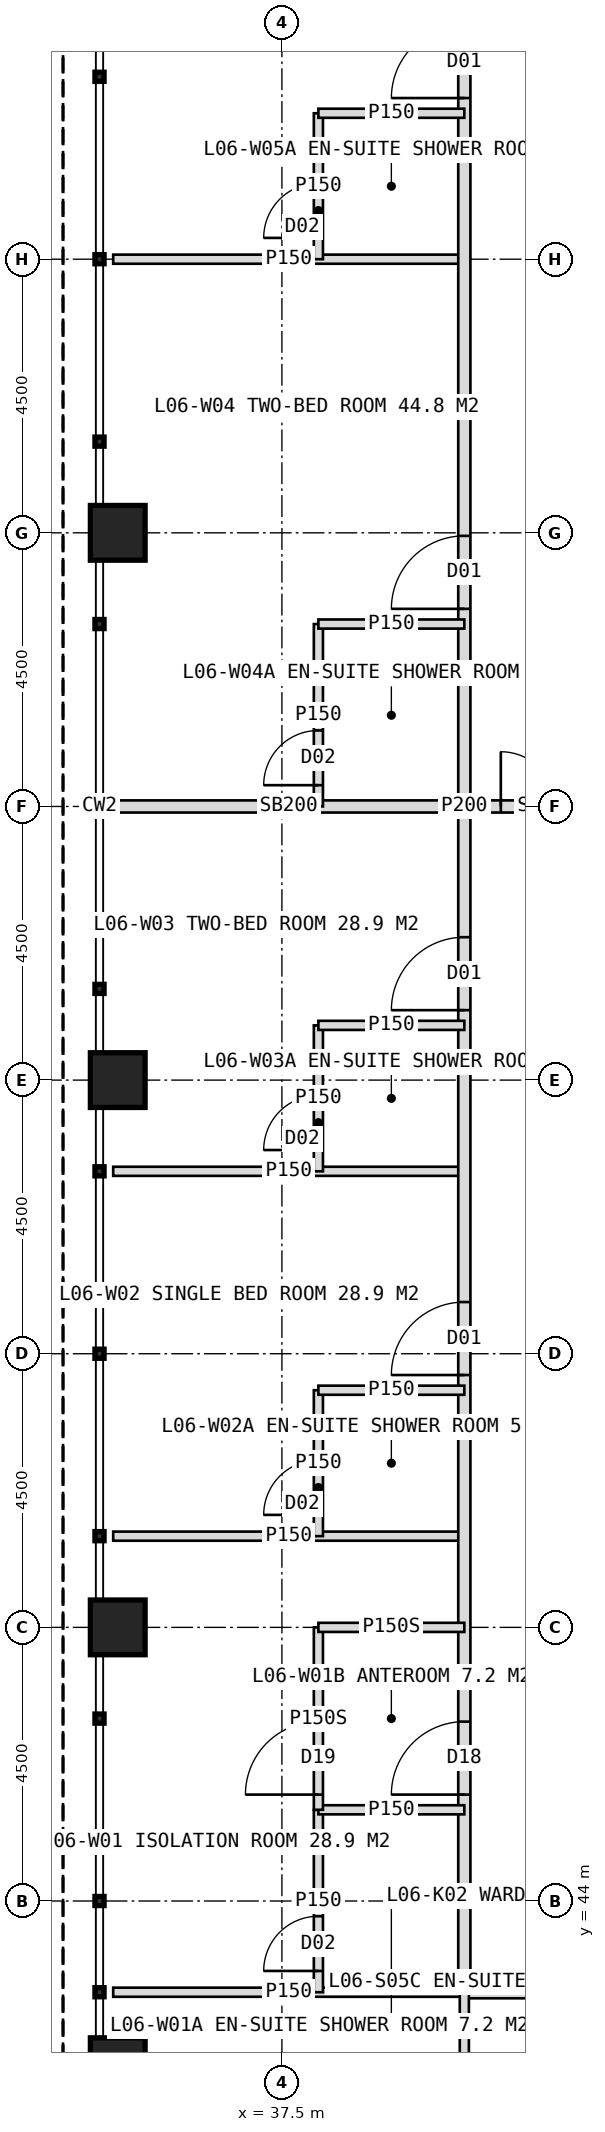
"""IFC4 building model, lengths in metres.
Left out: names, types, materials, properties, quantities, classifications, styles, units other than length and angle.
Written with IfcOpenShell. Run it as: python <this file> out.ifc"""

import sys

from ifc_helpers import new_model, si_unit, direction, frame, frame_2d, origin, origin_2d, place, context, subcontext, project, spatial, rectangle, hollow_rectangle, extrude, element, fill, save


model = new_model("IFC4")
c1 = context("Model", 3, precision=1e-05, world=origin(), true_north=direction((0.0, 1.0)))
c2 = subcontext(c1, "Body", "Model", "MODEL_VIEW")
j1 = project(units=[si_unit("LENGTHUNIT", "METRE"), si_unit("PLANEANGLEUNIT", "RADIAN")], contexts=[c1])
p1 = place(None, origin())
s1 = spatial("IfcSite", under=j1, at=p1, CompositionType="ELEMENT")
p2 = place(p1, origin())
s2 = spatial("IfcBuilding", under=s1, at=p2, CompositionType="ELEMENT")
p3 = place(p2, frame((0.0, 0.0, 31.0)))
s3 = spatial("IfcBuildingStorey", under=s2, at=p3, CompositionType="ELEMENT", Elevation=31.0)
for number, where, z_axis, x_axis in (
    (1, (34.8, 41.3, 0.0), (0.0, 0.0, 1.0), (1.0, 0.0, 0.0)),
    (2, (34.8, 48.5, 0.0), (0.0, 0.0, 1.0), (1.0, 0.0, 0.0)),
    (3, (34.8, 57.5, 0.0), (0.0, 0.0, 1.0), (1.0, 0.0, 0.0)),
    (4, (34.8, 66.5, 0.0), (0.0, 0.0, 1.0), (1.0, 0.0, 0.0)),
):
    element("IfcColumn", number, at=place(p3, frame(where, z_axis=z_axis, x_axis=x_axis)), inside=s3, PredefinedType="COLUMN", context=c2, shape_type="SweptSolid", body=[
        extrude(hollow_rectangle(XDim=0.9, YDim=0.9, WallThickness=0.08, at=origin_2d()), origin(), (0.0, 0.0, 1.0), 4.0),
    ])
for number, where, z_axis, x_axis in (
    (5, (40.5, 50.0, 0.0), (0.0, 0.0, 1.0), (-1.0, 0.0, 0.0)),
    (6, (40.5, 56.0, 0.0), (0.0, 0.0, 1.0), (-1.0, 0.0, 0.0)),
):
    element("IfcWall", number, at=place(p3, frame(where, z_axis=z_axis, x_axis=x_axis)), inside=s3, PredefinedType="PARTITIONING", context=c2, shape_type="SweptSolid", body=[
        extrude(rectangle(XDim=5.775, YDim=0.15, at=frame_2d((2.887, 0.0))), origin(), (0.0, 0.0, 1.0), 3.75),
    ])
p4 = place(p3, frame((40.5, 62.0, 0.0), z_axis=(0.0, 0.0, 1.0), x_axis=(-1.0, 0.0, 0.0)))
e7 = element("IfcWall", 7, at=p4, inside=s3, PredefinedType="SOLIDWALL", context=c2, shape_type="SweptSolid", body=[
    extrude(rectangle(XDim=5.775, YDim=0.2, at=frame_2d((2.887, 0.0))), origin(), (0.0, 0.0, 1.0), 2.75),
])
p5 = place(p3, frame((40.5, 71.0, 0.0), z_axis=(0.0, 0.0, 1.0), x_axis=(-1.0, 0.0, 0.0)))
e8 = element("IfcWall", 8, at=p5, inside=s3, PredefinedType="PARTITIONING", context=c2, shape_type="SweptSolid", body=[
    extrude(rectangle(XDim=5.775, YDim=0.15, at=frame_2d((2.887, 0.0))), origin(), (0.0, 0.0, 1.0), 3.75),
])
p6 = place(p3, frame((40.5, 42.5, 0.0), z_axis=(0.0, 0.0, 1.0), x_axis=(0.0, 1.0, 0.0)))
e9 = element("IfcWall", 9, at=p6, inside=s3, PredefinedType="PARTITIONING", context=c2, shape_type="SweptSolid", body=[
    extrude(rectangle(XDim=39.0, YDim=0.2, at=frame_2d((19.5, 0.0))), origin(), (0.0, 0.0, 1.0), 3.75),
])
p7 = place(p6, frame((3.25, 0.0, 0.0)))
e10 = element("IfcOpeningElement", 10, at=p7, cuts=e9, PredefinedType="OPENING", context=c2, shape_type="SweptSolid", body=[
    extrude(rectangle(XDim=1.2, YDim=2.2, at=frame_2d((0.6, 1.1))), frame((0.0, 0.11, 0.0), z_axis=(0.0, -1.0, 0.0), x_axis=(1.0, 0.0, 0.0)), (0.0, 0.0, 1.0), 0.22),
])
p8 = place(p6, frame((10.15, 0.0, 0.0)))
e11 = element("IfcOpeningElement", 11, at=p8, cuts=e9, PredefinedType="OPENING", context=c2, shape_type="SweptSolid", body=[
    extrude(rectangle(XDim=1.2, YDim=2.2, at=frame_2d((0.6, 1.1))), frame((0.0, 0.11, 0.0), z_axis=(0.0, -1.0, 0.0), x_axis=(1.0, 0.0, 0.0)), (0.0, 0.0, 1.0), 0.22),
])
p9 = place(p6, frame((16.15, 0.0, 0.0)))
e12 = element("IfcOpeningElement", 12, at=p9, cuts=e9, PredefinedType="OPENING", context=c2, shape_type="SweptSolid", body=[
    extrude(rectangle(XDim=1.2, YDim=2.2, at=frame_2d((0.6, 1.1))), frame((0.0, 0.11, 0.0), z_axis=(0.0, -1.0, 0.0), x_axis=(1.0, 0.0, 0.0)), (0.0, 0.0, 1.0), 0.22),
])
p10 = place(p6, frame((22.75, 0.0, 0.0)))
e13 = element("IfcOpeningElement", 13, at=p10, cuts=e9, PredefinedType="OPENING", context=c2, shape_type="SweptSolid", body=[
    extrude(rectangle(XDim=1.2, YDim=2.2, at=frame_2d((0.6, 1.1))), frame((0.0, 0.11, 0.0), z_axis=(0.0, -1.0, 0.0), x_axis=(1.0, 0.0, 0.0)), (0.0, 0.0, 1.0), 0.22),
])
p11 = place(p6, frame((31.15, 0.0, 0.0)))
e14 = element("IfcOpeningElement", 14, at=p11, cuts=e9, PredefinedType="OPENING", context=c2, shape_type="SweptSolid", body=[
    extrude(rectangle(XDim=1.2, YDim=2.2, at=frame_2d((0.6, 1.1))), frame((0.0, 0.11, 0.0), z_axis=(0.0, -1.0, 0.0), x_axis=(1.0, 0.0, 0.0)), (0.0, 0.0, 1.0), 0.22),
])
p12 = place(p3, frame((40.5, 42.5, 0.0), z_axis=(0.0, 0.0, 1.0), x_axis=(-1.0, 0.0, 0.0)))
e15 = element("IfcWall", 15, at=p12, inside=s3, PredefinedType="PARTITIONING", context=c2, shape_type="SweptSolid", body=[
    extrude(rectangle(XDim=5.775, YDim=0.15, at=frame_2d((2.887, 0.0))), origin(), (0.0, 0.0, 1.0), 3.75),
])
p13 = place(p3, frame((38.1, 42.5, 0.0), z_axis=(0.0, 0.0, 1.0), x_axis=(0.0, 1.0, 0.0)))
e16 = element("IfcWall", 16, at=p13, inside=s3, PredefinedType="PARTITIONING", context=c2, shape_type="SweptSolid", body=[
    extrude(rectangle(XDim=3.0, YDim=0.15, at=frame_2d((1.5, 0.0))), origin(), (0.0, 0.0, 1.0), 3.75),
])
p14 = place(p13, frame((0.35, 0.0, 0.0)))
e17 = element("IfcOpeningElement", 17, at=p14, cuts=e16, PredefinedType="OPENING", context=c2, shape_type="SweptSolid", body=[
    extrude(rectangle(XDim=0.9, YDim=2.1, at=frame_2d((0.45, 1.05))), frame((0.0, 0.085, 0.0), z_axis=(0.0, -1.0, 0.0), x_axis=(1.0, 0.0, 0.0)), (0.0, 0.0, 1.0), 0.17),
])
p15 = place(p3, frame((40.5, 45.5, 0.0), z_axis=(0.0, 0.0, 1.0), x_axis=(-1.0, 0.0, 0.0)))
e18 = element("IfcWall", 18, at=p15, inside=s3, PredefinedType="PARTITIONING", context=c2, shape_type="SweptSolid", body=[
    extrude(rectangle(XDim=2.4, YDim=0.15, at=frame_2d((1.2, 0.0))), origin(), (0.0, 0.0, 1.0), 3.75),
])
p16 = place(p3, frame((38.1, 45.5, 0.0), z_axis=(0.0, 0.0, 1.0), x_axis=(0.0, 1.0, 0.0)))
e19 = element("IfcWall", 19, at=p16, inside=s3, PredefinedType="PARTITIONING", context=c2, shape_type="SweptSolid", body=[
    extrude(rectangle(XDim=3.0, YDim=0.15, at=frame_2d((1.5, 0.0))), origin(), (0.0, 0.0, 1.0), 3.75),
])
p17 = place(p16, frame((0.25, 0.0, 0.0)))
e20 = element("IfcOpeningElement", 20, at=p17, cuts=e19, PredefinedType="OPENING", context=c2, shape_type="SweptSolid", body=[
    extrude(rectangle(XDim=1.2, YDim=2.2, at=frame_2d((0.6, 1.1))), frame((0.0, 0.085, 0.0), z_axis=(0.0, -1.0, 0.0), x_axis=(1.0, 0.0, 0.0)), (0.0, 0.0, 1.0), 0.17),
])
p18 = place(p3, frame((40.5, 48.5, 0.0), z_axis=(0.0, 0.0, 1.0), x_axis=(-1.0, 0.0, 0.0)))
e21 = element("IfcWall", 21, at=p18, inside=s3, PredefinedType="PARTITIONING", context=c2, shape_type="SweptSolid", body=[
    extrude(rectangle(XDim=2.4, YDim=0.15, at=frame_2d((1.2, 0.0))), origin(), (0.0, 0.0, 1.0), 2.95),
])
p19 = place(p3, frame((38.1, 50.0, 0.0), z_axis=(0.0, 0.0, 1.0), x_axis=(0.0, 1.0, 0.0)))
e22 = element("IfcWall", 22, at=p19, inside=s3, PredefinedType="PARTITIONING", context=c2, shape_type="SweptSolid", body=[
    extrude(rectangle(XDim=2.4, YDim=0.15, at=frame_2d((1.2, 0.0))), origin(), (0.0, 0.0, 1.0), 3.75),
])
p20 = place(p19, frame((0.35, 0.0, 0.0)))
e23 = element("IfcOpeningElement", 23, at=p20, cuts=e22, PredefinedType="OPENING", context=c2, shape_type="SweptSolid", body=[
    extrude(rectangle(XDim=0.9, YDim=2.1, at=frame_2d((0.45, 1.05))), frame((0.0, 0.085, 0.0), z_axis=(0.0, -1.0, 0.0), x_axis=(1.0, 0.0, 0.0)), (0.0, 0.0, 1.0), 0.17),
])
p21 = place(p3, frame((40.5, 52.4, 0.0), z_axis=(0.0, 0.0, 1.0), x_axis=(-1.0, 0.0, 0.0)))
e24 = element("IfcWall", 24, at=p21, inside=s3, PredefinedType="PARTITIONING", context=c2, shape_type="SweptSolid", body=[
    extrude(rectangle(XDim=2.4, YDim=0.15, at=frame_2d((1.2, 0.0))), origin(), (0.0, 0.0, 1.0), 3.75),
])
p22 = place(p3, frame((38.1, 56.0, 0.0), z_axis=(0.0, 0.0, 1.0), x_axis=(0.0, 1.0, 0.0)))
e25 = element("IfcWall", 25, at=p22, inside=s3, PredefinedType="PARTITIONING", context=c2, shape_type="SweptSolid", body=[
    extrude(rectangle(XDim=2.4, YDim=0.15, at=frame_2d((1.2, 0.0))), origin(), (0.0, 0.0, 1.0), 3.75),
])
p23 = place(p22, frame((0.35, 0.0, 0.0)))
e26 = element("IfcOpeningElement", 26, at=p23, cuts=e25, PredefinedType="OPENING", context=c2, shape_type="SweptSolid", body=[
    extrude(rectangle(XDim=0.9, YDim=2.1, at=frame_2d((0.45, 1.05))), frame((0.0, 0.085, 0.0), z_axis=(0.0, -1.0, 0.0), x_axis=(1.0, 0.0, 0.0)), (0.0, 0.0, 1.0), 0.17),
])
p24 = place(p3, frame((40.5, 58.4, 0.0), z_axis=(0.0, 0.0, 1.0), x_axis=(-1.0, 0.0, 0.0)))
e27 = element("IfcWall", 27, at=p24, inside=s3, PredefinedType="PARTITIONING", context=c2, shape_type="SweptSolid", body=[
    extrude(rectangle(XDim=2.4, YDim=0.15, at=frame_2d((1.2, 0.0))), origin(), (0.0, 0.0, 1.0), 3.75),
])
p25 = place(p3, frame((38.1, 62.0, 0.0), z_axis=(0.0, 0.0, 1.0), x_axis=(0.0, 1.0, 0.0)))
e28 = element("IfcWall", 28, at=p25, inside=s3, PredefinedType="PARTITIONING", context=c2, shape_type="SweptSolid", body=[
    extrude(rectangle(XDim=3.0, YDim=0.15, at=frame_2d((1.5, 0.0))), origin(), (0.0, 0.0, 1.0), 3.75),
])
p26 = place(p25, frame((0.35, 0.0, 0.0)))
e29 = element("IfcOpeningElement", 29, at=p26, cuts=e28, PredefinedType="OPENING", context=c2, shape_type="SweptSolid", body=[
    extrude(rectangle(XDim=0.9, YDim=2.1, at=frame_2d((0.45, 1.05))), frame((0.0, 0.085, 0.0), z_axis=(0.0, -1.0, 0.0), x_axis=(1.0, 0.0, 0.0)), (0.0, 0.0, 1.0), 0.17),
])
p27 = place(p3, frame((40.5, 65.0, 0.0), z_axis=(0.0, 0.0, 1.0), x_axis=(-1.0, 0.0, 0.0)))
e30 = element("IfcWall", 30, at=p27, inside=s3, PredefinedType="PARTITIONING", context=c2, shape_type="SweptSolid", body=[
    extrude(rectangle(XDim=2.4, YDim=0.15, at=frame_2d((1.2, 0.0))), origin(), (0.0, 0.0, 1.0), 3.75),
])
p28 = place(p3, frame((38.1, 71.0, 0.0), z_axis=(0.0, 0.0, 1.0), x_axis=(0.0, 1.0, 0.0)))
e31 = element("IfcWall", 31, at=p28, inside=s3, PredefinedType="PARTITIONING", context=c2, shape_type="SweptSolid", body=[
    extrude(rectangle(XDim=2.4, YDim=0.15, at=frame_2d((1.2, 0.0))), origin(), (0.0, 0.0, 1.0), 3.75),
])
p29 = place(p28, frame((0.35, 0.0, 0.0)))
e32 = element("IfcOpeningElement", 32, at=p29, cuts=e31, PredefinedType="OPENING", context=c2, shape_type="SweptSolid", body=[
    extrude(rectangle(XDim=0.9, YDim=2.1, at=frame_2d((0.45, 1.05))), frame((0.0, 0.085, 0.0), z_axis=(0.0, -1.0, 0.0), x_axis=(1.0, 0.0, 0.0)), (0.0, 0.0, 1.0), 0.17),
])
p30 = place(p3, frame((40.5, 73.4, 0.0), z_axis=(0.0, 0.0, 1.0), x_axis=(-1.0, 0.0, 0.0)))
e33 = element("IfcWall", 33, at=p30, inside=s3, PredefinedType="PARTITIONING", context=c2, shape_type="SweptSolid", body=[
    extrude(rectangle(XDim=2.4, YDim=0.15, at=frame_2d((1.2, 0.0))), origin(), (0.0, 0.0, 1.0), 3.75),
])
p31 = place(p3, frame((79.5, 42.5, 0.0), z_axis=(0.0, 0.0, 1.0), x_axis=(-1.0, 0.0, 0.0)))
e34 = element("IfcWall", 34, at=p31, inside=s3, PredefinedType="PARTITIONING", context=c2, shape_type="SweptSolid", body=[
    extrude(rectangle(XDim=39.0, YDim=0.2, at=frame_2d((19.5, 0.0))), origin(), (0.0, 0.0, 1.0), 3.75),
])
p32 = place(p31, frame((3.25, 0.0, 0.0)))
e35 = element("IfcOpeningElement", 35, at=p32, cuts=e34, PredefinedType="OPENING", context=c2, shape_type="SweptSolid", body=[
    extrude(rectangle(XDim=1.2, YDim=2.2, at=frame_2d((0.6, 1.1))), frame((0.0, 0.11, 0.0), z_axis=(0.0, -1.0, 0.0), x_axis=(1.0, 0.0, 0.0)), (0.0, 0.0, 1.0), 0.22),
])
p33 = place(p31, frame((10.15, 0.0, 0.0)))
e36 = element("IfcOpeningElement", 36, at=p33, cuts=e34, PredefinedType="OPENING", context=c2, shape_type="SweptSolid", body=[
    extrude(rectangle(XDim=1.2, YDim=2.2, at=frame_2d((0.6, 1.1))), frame((0.0, 0.11, 0.0), z_axis=(0.0, -1.0, 0.0), x_axis=(1.0, 0.0, 0.0)), (0.0, 0.0, 1.0), 0.22),
])
p34 = place(p31, frame((16.15, 0.0, 0.0)))
e37 = element("IfcOpeningElement", 37, at=p34, cuts=e34, PredefinedType="OPENING", context=c2, shape_type="SweptSolid", body=[
    extrude(rectangle(XDim=1.2, YDim=2.2, at=frame_2d((0.6, 1.1))), frame((0.0, 0.11, 0.0), z_axis=(0.0, -1.0, 0.0), x_axis=(1.0, 0.0, 0.0)), (0.0, 0.0, 1.0), 0.22),
])
p35 = place(p31, frame((22.75, 0.0, 0.0)))
e38 = element("IfcOpeningElement", 38, at=p35, cuts=e34, PredefinedType="OPENING", context=c2, shape_type="SweptSolid", body=[
    extrude(rectangle(XDim=1.2, YDim=2.2, at=frame_2d((0.6, 1.1))), frame((0.0, 0.11, 0.0), z_axis=(0.0, -1.0, 0.0), x_axis=(1.0, 0.0, 0.0)), (0.0, 0.0, 1.0), 0.22),
])
p36 = place(p31, frame((31.15, 0.0, 0.0)))
e39 = element("IfcOpeningElement", 39, at=p36, cuts=e34, PredefinedType="OPENING", context=c2, shape_type="SweptSolid", body=[
    extrude(rectangle(XDim=1.2, YDim=2.2, at=frame_2d((0.6, 1.1))), frame((0.0, 0.11, 0.0), z_axis=(0.0, -1.0, 0.0), x_axis=(1.0, 0.0, 0.0)), (0.0, 0.0, 1.0), 0.22),
])
p37 = place(p3, frame((40.5, 42.5, 0.0), z_axis=(0.0, 0.0, 1.0), x_axis=(0.0, -1.0, 0.0)))
e40 = element("IfcWall", 40, at=p37, inside=s3, PredefinedType="PARTITIONING", context=c2, shape_type="SweptSolid", body=[
    extrude(rectangle(XDim=2.4, YDim=0.15, at=frame_2d((1.2, 0.0))), origin(), (0.0, 0.0, 1.0), 3.75),
])
p38 = place(p3, frame((43.2, 62.0, 0.0), z_axis=(0.0, 0.0, 1.0), x_axis=(-1.0, 0.0, 0.0)))
e41 = element("IfcWall", 41, at=p38, inside=s3, PredefinedType="SOLIDWALL", context=c2, shape_type="SweptSolid", body=[
    extrude(rectangle(XDim=2.7, YDim=0.2, at=frame_2d((1.35, 0.0))), origin(), (0.0, 0.0, 1.0), 2.75),
])
p39 = place(p38, frame((0.3, 0.0, 0.0)))
e42 = element("IfcOpeningElement", 42, at=p39, cuts=e41, PredefinedType="OPENING", context=c2, shape_type="SweptSolid", body=[
    extrude(rectangle(XDim=1.8, YDim=2.2, at=frame_2d((0.9, 1.1))), frame((0.0, 0.11, 0.0), z_axis=(0.0, -1.0, 0.0), x_axis=(1.0, 0.0, 0.0)), (0.0, 0.0, 1.0), 0.22),
])
p40 = place(p17, origin())
e43 = element("IfcDoor", 43, at=p40, inside=s3, OperationType="SINGLE_SWING_LEFT", PredefinedType="DOOR", context=c2, shape_type="SweptSolid", body=[
    extrude(rectangle(XDim=1.2, YDim=2.2, at=frame_2d((0.6, 1.1))), frame((0.0, 0.025, 0.0), z_axis=(0.0, -1.0, 0.0), x_axis=(1.0, 0.0, 0.0)), (0.0, 0.0, 1.0), 0.05),
])
fill(e20, e43)
p41 = place(p7, origin())
e44 = element("IfcDoor", 44, at=p41, inside=s3, OperationType="SINGLE_SWING_LEFT", PredefinedType="DOOR", context=c2, shape_type="SweptSolid", body=[
    extrude(rectangle(XDim=1.2, YDim=2.2, at=frame_2d((0.6, 1.1))), frame((0.0, 0.025, 0.0), z_axis=(0.0, -1.0, 0.0), x_axis=(1.0, 0.0, 0.0)), (0.0, 0.0, 1.0), 0.05),
])
fill(e10, e44)
p42 = place(p14, origin())
e45 = element("IfcDoor", 45, at=p42, inside=s3, OperationType="SINGLE_SWING_LEFT", PredefinedType="DOOR", context=c2, shape_type="SweptSolid", body=[
    extrude(rectangle(XDim=0.9, YDim=2.1, at=frame_2d((0.45, 1.05))), frame((0.0, 0.025, 0.0), z_axis=(0.0, -1.0, 0.0), x_axis=(1.0, 0.0, 0.0)), (0.0, 0.0, 1.0), 0.05),
])
fill(e17, e45)
p43 = place(p8, origin())
e46 = element("IfcDoor", 46, at=p43, inside=s3, OperationType="SINGLE_SWING_LEFT", PredefinedType="DOOR", context=c2, shape_type="SweptSolid", body=[
    extrude(rectangle(XDim=1.2, YDim=2.2, at=frame_2d((0.6, 1.1))), frame((0.0, 0.025, 0.0), z_axis=(0.0, -1.0, 0.0), x_axis=(1.0, 0.0, 0.0)), (0.0, 0.0, 1.0), 0.05),
])
fill(e11, e46)
p44 = place(p20, origin())
e47 = element("IfcDoor", 47, at=p44, inside=s3, OperationType="SINGLE_SWING_LEFT", PredefinedType="DOOR", context=c2, shape_type="SweptSolid", body=[
    extrude(rectangle(XDim=0.9, YDim=2.1, at=frame_2d((0.45, 1.05))), frame((0.0, 0.025, 0.0), z_axis=(0.0, -1.0, 0.0), x_axis=(1.0, 0.0, 0.0)), (0.0, 0.0, 1.0), 0.05),
])
fill(e23, e47)
p45 = place(p9, origin())
e48 = element("IfcDoor", 48, at=p45, inside=s3, OperationType="SINGLE_SWING_LEFT", PredefinedType="DOOR", context=c2, shape_type="SweptSolid", body=[
    extrude(rectangle(XDim=1.2, YDim=2.2, at=frame_2d((0.6, 1.1))), frame((0.0, 0.025, 0.0), z_axis=(0.0, -1.0, 0.0), x_axis=(1.0, 0.0, 0.0)), (0.0, 0.0, 1.0), 0.05),
])
fill(e12, e48)
p46 = place(p23, origin())
e49 = element("IfcDoor", 49, at=p46, inside=s3, OperationType="SINGLE_SWING_LEFT", PredefinedType="DOOR", context=c2, shape_type="SweptSolid", body=[
    extrude(rectangle(XDim=0.9, YDim=2.1, at=frame_2d((0.45, 1.05))), frame((0.0, 0.025, 0.0), z_axis=(0.0, -1.0, 0.0), x_axis=(1.0, 0.0, 0.0)), (0.0, 0.0, 1.0), 0.05),
])
fill(e26, e49)
p47 = place(p10, origin())
e50 = element("IfcDoor", 50, at=p47, inside=s3, OperationType="SINGLE_SWING_LEFT", PredefinedType="DOOR", context=c2, shape_type="SweptSolid", body=[
    extrude(rectangle(XDim=1.2, YDim=2.2, at=frame_2d((0.6, 1.1))), frame((0.0, 0.025, 0.0), z_axis=(0.0, -1.0, 0.0), x_axis=(1.0, 0.0, 0.0)), (0.0, 0.0, 1.0), 0.05),
])
fill(e13, e50)
p48 = place(p26, origin())
e51 = element("IfcDoor", 51, at=p48, inside=s3, OperationType="SINGLE_SWING_LEFT", PredefinedType="DOOR", context=c2, shape_type="SweptSolid", body=[
    extrude(rectangle(XDim=0.9, YDim=2.1, at=frame_2d((0.45, 1.05))), frame((0.0, 0.025, 0.0), z_axis=(0.0, -1.0, 0.0), x_axis=(1.0, 0.0, 0.0)), (0.0, 0.0, 1.0), 0.05),
])
fill(e29, e51)
p49 = place(p11, origin())
e52 = element("IfcDoor", 52, at=p49, inside=s3, OperationType="SINGLE_SWING_LEFT", PredefinedType="DOOR", context=c2, shape_type="SweptSolid", body=[
    extrude(rectangle(XDim=1.2, YDim=2.2, at=frame_2d((0.6, 1.1))), frame((0.0, 0.025, 0.0), z_axis=(0.0, -1.0, 0.0), x_axis=(1.0, 0.0, 0.0)), (0.0, 0.0, 1.0), 0.05),
])
fill(e14, e52)
p50 = place(p29, origin())
e53 = element("IfcDoor", 53, at=p50, inside=s3, OperationType="SINGLE_SWING_LEFT", PredefinedType="DOOR", context=c2, shape_type="SweptSolid", body=[
    extrude(rectangle(XDim=0.9, YDim=2.1, at=frame_2d((0.45, 1.05))), frame((0.0, 0.025, 0.0), z_axis=(0.0, -1.0, 0.0), x_axis=(1.0, 0.0, 0.0)), (0.0, 0.0, 1.0), 0.05),
])
fill(e32, e53)
p51 = place(p39, origin())
e54 = element("IfcDoor", 54, at=p51, inside=s3, OperationType="DOUBLE_DOOR_DOUBLE_SWING", PredefinedType="DOOR", context=c2, shape_type="SweptSolid", body=[
    extrude(rectangle(XDim=1.8, YDim=2.2, at=frame_2d((0.9, 1.1))), frame((0.0, 0.025, 0.0), z_axis=(0.0, -1.0, 0.0), x_axis=(1.0, 0.0, 0.0)), (0.0, 0.0, 1.0), 0.05),
])
fill(e42, e54)
save(model, sys.argv[1])
